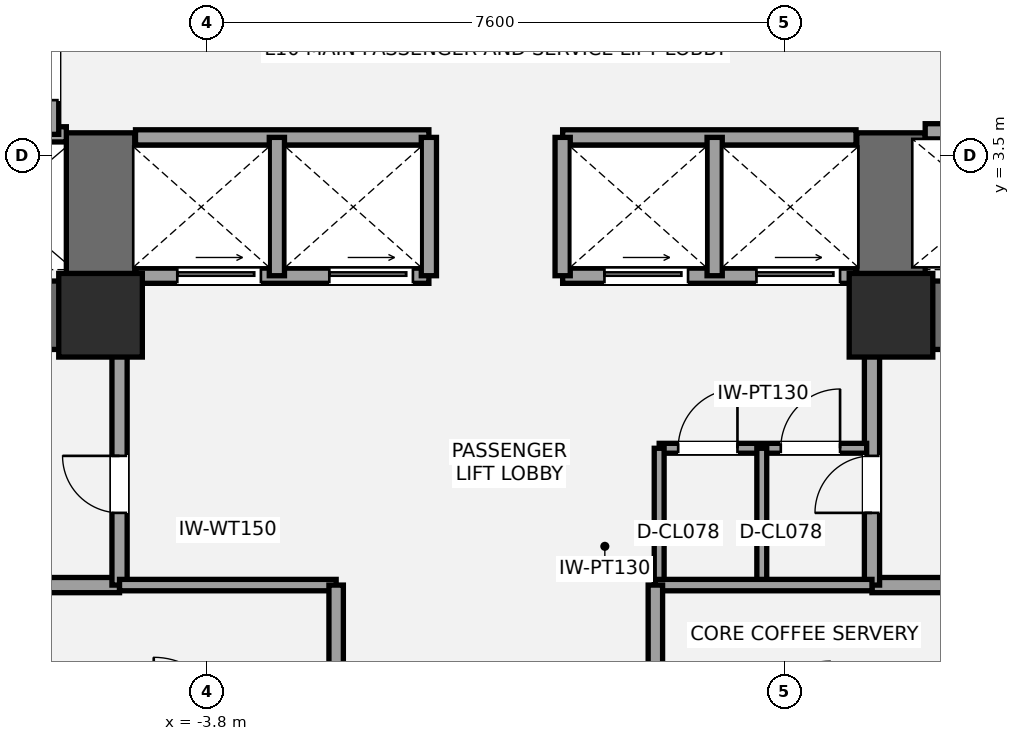
"""IFC4 building model, lengths in metres.
Left out: names, types, materials, properties, quantities, classifications, styles, units other than length and angle.
Written with IfcOpenShell. Run it as: python <this file> out.ifc"""

import sys

from ifc_helpers import new_model, si_unit, direction, frame, frame_2d, origin, origin_2d, place, context, subcontext, project, spatial, rectangle, extrude, element, fill, save


model = new_model("IFC4")
c1 = context("Model", 3, precision=1e-05, world=origin(), true_north=direction((0.0, 1.0)))
c2 = subcontext(c1, "Body", "Model", "MODEL_VIEW")
j1 = project(units=[si_unit("LENGTHUNIT", "METRE"), si_unit("PLANEANGLEUNIT", "RADIAN")], contexts=[c1])
p1 = place(None, origin())
s1 = spatial("IfcSite", under=j1, at=p1, CompositionType="ELEMENT")
p2 = place(p1, origin())
s2 = spatial("IfcBuilding", under=s1, at=p2, CompositionType="ELEMENT")
p3 = place(p2, frame((0.0, 0.0, 41.4)))
s3 = spatial("IfcBuildingStorey", under=s2, at=p3, CompositionType="ELEMENT", Elevation=41.4)
p4 = place(p3, frame((-4.75, 1.4, 0.0), z_axis=(0.0, 0.0, 1.0), x_axis=(-1.0, 0.0, 0.0)))
e1 = element("IfcWall", 1, at=p4, inside=s3, PredefinedType="SHEAR", context=c2, shape_type="SweptSolid", body=[
    extrude(rectangle(XDim=9.3, YDim=0.9, at=frame_2d((4.65, 0.0))), origin(), (0.0, 0.0, 1.0), 3.6),
])
p5 = place(p4, frame((5.55, 0.0, 0.0)))
e2 = element("IfcOpeningElement", 2, at=p5, cuts=e1, PredefinedType="OPENING", context=c2, shape_type="SweptSolid", body=[
    extrude(rectangle(XDim=1.05, YDim=2.15, at=frame_2d((0.525, 1.075))), frame((0.0, 0.46, 0.0), z_axis=(0.0, -1.0, 0.0), x_axis=(1.0, 0.0, 0.0)), (0.0, 0.0, 1.0), 0.92),
])
p6 = place(p4, frame((3.88, 0.0, 0.0)))
e3 = element("IfcOpeningElement", 3, at=p6, cuts=e1, PredefinedType="OPENING", context=c2, shape_type="SweptSolid", body=[
    extrude(rectangle(XDim=1.1, YDim=2.2, at=frame_2d((0.55, 1.1))), frame((0.0, 0.46, 0.0), z_axis=(0.0, -1.0, 0.0), x_axis=(1.0, 0.0, 0.0)), (0.0, 0.0, 1.0), 0.92),
])
p7 = place(p3, frame((-5.2, 0.95, 0.0), z_axis=(0.0, 0.0, 1.0), x_axis=(0.0, 1.0, 0.0)))
e4 = element("IfcWall", 4, at=p7, inside=s3, PredefinedType="SHEAR", context=c2, shape_type="SweptSolid", body=[
    extrude(rectangle(XDim=2.85, YDim=0.9, at=frame_2d((1.425, 0.0))), origin(), (0.0, 0.0, 1.0), 3.6),
])
p8 = place(p3, frame((14.05, 1.4, 0.0), z_axis=(0.0, 0.0, 1.0), x_axis=(-1.0, 0.0, 0.0)))
e5 = element("IfcWall", 5, at=p8, inside=s3, PredefinedType="SHEAR", context=c2, shape_type="SweptSolid", body=[
    extrude(rectangle(XDim=9.3, YDim=0.9, at=frame_2d((4.65, 0.0))), origin(), (0.0, 0.0, 1.0), 3.6),
])
p9 = place(p8, frame((2.7, 0.0, 0.0)))
e6 = element("IfcOpeningElement", 6, at=p9, cuts=e5, PredefinedType="OPENING", context=c2, shape_type="SweptSolid", body=[
    extrude(rectangle(XDim=1.05, YDim=2.15, at=frame_2d((0.525, 1.075))), frame((0.0, 0.46, 0.0), z_axis=(0.0, -1.0, 0.0), x_axis=(1.0, 0.0, 0.0)), (0.0, 0.0, 1.0), 0.92),
])
p10 = place(p8, frame((4.7, 0.0, 0.0)))
e7 = element("IfcOpeningElement", 7, at=p10, cuts=e5, PredefinedType="OPENING", context=c2, shape_type="SweptSolid", body=[
    extrude(rectangle(XDim=1.1, YDim=2.2, at=frame_2d((0.55, 1.1))), frame((0.0, 0.46, 0.0), z_axis=(0.0, -1.0, 0.0), x_axis=(1.0, 0.0, 0.0)), (0.0, 0.0, 1.0), 0.92),
])
p11 = place(p3, frame((5.2, 0.95, 0.0), z_axis=(0.0, 0.0, 1.0), x_axis=(0.0, 1.0, 0.0)))
e8 = element("IfcWall", 8, at=p11, inside=s3, PredefinedType="SHEAR", context=c2, shape_type="SweptSolid", body=[
    extrude(rectangle(XDim=2.85, YDim=0.9, at=frame_2d((1.425, 0.0))), origin(), (0.0, 0.0, 1.0), 3.6),
])
for number, where, z_axis, x_axis in (
    (9, (-5.2, 1.4, 0.0), (0.0, 0.0, 1.0), (1.0, 0.0, 0.0)),
    (10, (5.2, 1.4, 0.0), (0.0, 0.0, 1.0), (1.0, 0.0, 0.0)),
):
    element("IfcColumn", number, at=place(p3, frame(where, z_axis=z_axis, x_axis=x_axis)), inside=s3, PredefinedType="COLUMN", context=c2, shape_type="SweptSolid", body=[
        extrude(rectangle(XDim=1.1, YDim=1.1, at=origin_2d()), origin(), (0.0, 0.0, 1.0), 3.6),
    ])
p12 = place(p3, frame((-7.2, -2.15, 0.0), z_axis=(0.0, 0.0, 1.0), x_axis=(1.0, 0.0, 0.0)))
e11 = element("IfcWall", 11, at=p12, inside=s3, PredefinedType="SOLIDWALL", context=c2, shape_type="SweptSolid", body=[
    extrude(rectangle(XDim=2.25, YDim=0.2, at=frame_2d((1.125, 0.0))), origin(), (0.0, 0.0, 1.0), 3.4),
])
p13 = place(p3, frame((-4.95, -2.15, 0.0), z_axis=(0.0, 0.0, 1.0), x_axis=(0.0, 1.0, 0.0)))
e12 = element("IfcWall", 12, at=p13, inside=s3, PredefinedType="SOLIDWALL", context=c2, shape_type="SweptSolid", body=[
    extrude(rectangle(XDim=3.15, YDim=0.2, at=frame_2d((1.575, 0.0))), origin(), (0.0, 0.0, 1.0), 2.853),
])
p14 = place(p13, frame((0.95, 0.0, 0.0)))
e13 = element("IfcOpeningElement", 13, at=p14, cuts=e12, PredefinedType="OPENING", context=c2, shape_type="SweptSolid", body=[
    extrude(rectangle(XDim=0.75, YDim=2.1, at=frame_2d((0.375, 1.05))), frame((0.0, 0.11, 0.0), z_axis=(0.0, -1.0, 0.0), x_axis=(1.0, 0.0, 0.0)), (0.0, 0.0, 1.0), 0.22),
])
p15 = place(p3, frame((4.95, -2.15, 0.0), z_axis=(0.0, 0.0, 1.0), x_axis=(1.0, 0.0, 0.0)))
e14 = element("IfcWall", 14, at=p15, inside=s3, PredefinedType="SOLIDWALL", context=c2, shape_type="SweptSolid", body=[
    extrude(rectangle(XDim=2.25, YDim=0.2, at=frame_2d((1.125, 0.0))), origin(), (0.0, 0.0, 1.0), 3.4),
])
p16 = place(p3, frame((4.95, -2.15, 0.0), z_axis=(0.0, 0.0, 1.0), x_axis=(0.0, 1.0, 0.0)))
e15 = element("IfcWall", 15, at=p16, inside=s3, PredefinedType="SOLIDWALL", context=c2, shape_type="SweptSolid", body=[
    extrude(rectangle(XDim=3.15, YDim=0.2, at=frame_2d((1.575, 0.0))), origin(), (0.0, 0.0, 1.0), 3.4),
])
p17 = place(p16, frame((0.95, 0.0, 0.0)))
e16 = element("IfcOpeningElement", 16, at=p17, cuts=e15, PredefinedType="OPENING", context=c2, shape_type="SweptSolid", body=[
    extrude(rectangle(XDim=0.75, YDim=2.1, at=frame_2d((0.375, 1.05))), frame((0.0, 0.11, 0.0), z_axis=(0.0, -1.0, 0.0), x_axis=(1.0, 0.0, 0.0)), (0.0, 0.0, 1.0), 0.22),
])
p18 = place(p3, frame((2.15, -0.35, 0.0), z_axis=(0.0, 0.0, 1.0), x_axis=(1.0, 0.0, 0.0)))
e17 = element("IfcWall", 17, at=p18, inside=s3, PredefinedType="PARTITIONING", context=c2, shape_type="SweptSolid", body=[
    extrude(rectangle(XDim=2.73, YDim=0.13, at=frame_2d((1.365, 0.0))), origin(), (0.0, 0.0, 1.0), 3.4),
])
p19 = place(p18, frame((0.25, 0.0, 0.0)))
e18 = element("IfcOpeningElement", 18, at=p19, cuts=e17, PredefinedType="OPENING", context=c2, shape_type="SweptSolid", body=[
    extrude(rectangle(XDim=0.78, YDim=2.1, at=frame_2d((0.39, 1.05))), frame((0.0, 0.075, 0.0), z_axis=(0.0, -1.0, 0.0), x_axis=(1.0, 0.0, 0.0)), (0.0, 0.0, 1.0), 0.15),
])
p20 = place(p18, frame((1.6, 0.0, 0.0)))
e19 = element("IfcOpeningElement", 19, at=p20, cuts=e17, PredefinedType="OPENING", context=c2, shape_type="SweptSolid", body=[
    extrude(rectangle(XDim=0.78, YDim=2.1, at=frame_2d((0.39, 1.05))), frame((0.0, 0.075, 0.0), z_axis=(0.0, -1.0, 0.0), x_axis=(1.0, 0.0, 0.0)), (0.0, 0.0, 1.0), 0.15),
])
for number, where, z_axis, x_axis in (
    (20, (2.15, -2.15, 0.0), (0.0, 0.0, 1.0), (0.0, 1.0, 0.0)),
    (21, (3.5, -2.15, 0.0), (0.0, 0.0, 1.0), (0.0, 1.0, 0.0)),
):
    element("IfcWall", number, at=place(p3, frame(where, z_axis=z_axis, x_axis=x_axis)), inside=s3, PredefinedType="PARTITIONING", context=c2, shape_type="SweptSolid", body=[
        extrude(rectangle(XDim=1.8, YDim=0.13, at=frame_2d((0.9, 0.0))), origin(), (0.0, 0.0, 1.0), 3.4),
    ])
p21 = place(p3, frame((-9.78, 3.78, 0.0), z_axis=(0.0, 0.0, 1.0), x_axis=(1.0, 0.0, 0.0)))
e22 = element("IfcWall", 22, at=p21, inside=s3, PredefinedType="SOLIDWALL", context=c2, shape_type="SweptSolid", body=[
    extrude(rectangle(XDim=4.13, YDim=0.2, at=frame_2d((2.065, 0.0))), origin(), (0.0, 0.0, 1.0), 3.4),
])
p22 = place(p3, frame((-5.85, 3.78, 0.0), z_axis=(0.0, 0.0, 1.0), x_axis=(0.0, 1.0, 0.0)))
e23 = element("IfcWall", 23, at=p22, inside=s3, PredefinedType="SOLIDWALL", context=c2, shape_type="SweptSolid", body=[
    extrude(rectangle(XDim=1.69, YDim=0.2, at=frame_2d((0.845, 0.0))), origin(), (0.0, 0.0, 1.0), 3.4),
])
p23 = place(p22, frame((0.45, 0.0, 0.0)))
e24 = element("IfcOpeningElement", 24, at=p23, cuts=e23, PredefinedType="OPENING", context=c2, shape_type="SweptSolid", body=[
    extrude(rectangle(XDim=0.75, YDim=2.1, at=frame_2d((0.375, 1.05))), frame((0.0, 0.11, 0.0), z_axis=(0.0, -1.0, 0.0), x_axis=(1.0, 0.0, 0.0)), (0.0, 0.0, 1.0), 0.22),
])
p24 = place(p3, frame((5.65, 3.82, 0.0), z_axis=(0.0, 0.0, 1.0), x_axis=(1.0, 0.0, 0.0)))
e25 = element("IfcWall", 25, at=p24, inside=s3, PredefinedType="SOLIDWALL", context=c2, shape_type="SweptSolid", body=[
    extrude(rectangle(XDim=4.13, YDim=0.2, at=frame_2d((2.065, 0.0))), origin(), (0.0, 0.0, 1.0), 3.4),
])
p25 = place(p24, frame((0.65, 0.0, 0.0)))
e26 = element("IfcOpeningElement", 26, at=p25, cuts=e25, PredefinedType="OPENING", context=c2, shape_type="SweptSolid", body=[
    extrude(rectangle(XDim=1.2, YDim=2.2, at=frame_2d((0.6, 1.1))), frame((0.0, 0.11, 0.0), z_axis=(0.0, -1.0, 0.0), x_axis=(1.0, 0.0, 0.0)), (0.0, 0.0, 1.0), 0.22),
])
p26 = place(p3, frame((-4.74, 1.92, 0.0), z_axis=(0.0, 0.0, 1.0), x_axis=(1.0, 0.0, 0.0)))
e27 = element("IfcWall", 27, at=p26, inside=s3, PredefinedType="SOLIDWALL", context=c2, shape_type="SweptSolid", body=[
    extrude(rectangle(XDim=3.86, YDim=0.2, at=frame_2d((1.93, 0.0))), origin(), (0.0, 0.0, 1.0), 2.39),
])
p27 = place(p26, frame((0.55, 0.0, 0.0)))
e28 = element("IfcOpeningElement", 28, at=p27, cuts=e27, PredefinedType="OPENING", context=c2, shape_type="SweptSolid", body=[
    extrude(rectangle(XDim=1.1, YDim=2.2, at=frame_2d((0.55, 1.1))), frame((0.0, 0.11, 0.0), z_axis=(0.0, -1.0, 0.0), x_axis=(1.0, 0.0, 0.0)), (0.0, 0.0, 1.0), 0.22),
])
p28 = place(p26, frame((2.55, 0.0, 0.0)))
e29 = element("IfcOpeningElement", 29, at=p28, cuts=e27, PredefinedType="OPENING", context=c2, shape_type="SweptSolid", body=[
    extrude(rectangle(XDim=1.1, YDim=2.2, at=frame_2d((0.55, 1.1))), frame((0.0, 0.11, 0.0), z_axis=(0.0, -1.0, 0.0), x_axis=(1.0, 0.0, 0.0)), (0.0, 0.0, 1.0), 0.22),
])
p29 = place(p3, frame((0.88, 1.92, 0.0), z_axis=(0.0, 0.0, 1.0), x_axis=(1.0, 0.0, 0.0)))
e30 = element("IfcWall", 30, at=p29, inside=s3, PredefinedType="SOLIDWALL", context=c2, shape_type="SweptSolid", body=[
    extrude(rectangle(XDim=3.86, YDim=0.2, at=frame_2d((1.93, 0.0))), origin(), (0.0, 0.0, 1.0), 2.39),
])
p30 = place(p29, frame((0.55, 0.0, 0.0)))
e31 = element("IfcOpeningElement", 31, at=p30, cuts=e30, PredefinedType="OPENING", context=c2, shape_type="SweptSolid", body=[
    extrude(rectangle(XDim=1.1, YDim=2.2, at=frame_2d((0.55, 1.1))), frame((0.0, 0.11, 0.0), z_axis=(0.0, -1.0, 0.0), x_axis=(1.0, 0.0, 0.0)), (0.0, 0.0, 1.0), 0.22),
])
p31 = place(p29, frame((2.55, 0.0, 0.0)))
e32 = element("IfcOpeningElement", 32, at=p31, cuts=e30, PredefinedType="OPENING", context=c2, shape_type="SweptSolid", body=[
    extrude(rectangle(XDim=1.1, YDim=2.2, at=frame_2d((0.55, 1.1))), frame((0.0, 0.11, 0.0), z_axis=(0.0, -1.0, 0.0), x_axis=(1.0, 0.0, 0.0)), (0.0, 0.0, 1.0), 0.22),
])
for number, where, z_axis, x_axis in (
    (33, (-4.74, 3.74, 0.0), (0.0, 0.0, 1.0), (1.0, 0.0, 0.0)),
    (34, (0.88, 3.74, 0.0), (0.0, 0.0, 1.0), (1.0, 0.0, 0.0)),
):
    element("IfcWall", number, at=place(p3, frame(where, z_axis=z_axis, x_axis=x_axis)), inside=s3, PredefinedType="SOLIDWALL", context=c2, shape_type="SweptSolid", body=[
        extrude(rectangle(XDim=3.86, YDim=0.2, at=frame_2d((1.93, 0.0))), origin(), (0.0, 0.0, 1.0), 3.4),
    ])
for number, where, z_axis, x_axis in (
    (35, (-2.88, 1.92, 0.0), (0.0, 0.0, 1.0), (0.0, 1.0, 0.0)),
    (36, (2.88, 1.92, 0.0), (0.0, 0.0, 1.0), (0.0, 1.0, 0.0)),
    (37, (-0.88, 1.92, 0.0), (0.0, 0.0, 1.0), (0.0, 1.0, 0.0)),
    (38, (0.88, 1.92, 0.0), (0.0, 0.0, 1.0), (0.0, 1.0, 0.0)),
):
    element("IfcWall", number, at=place(p3, frame(where, z_axis=z_axis, x_axis=x_axis)), inside=s3, PredefinedType="SOLIDWALL", context=c2, shape_type="SweptSolid", body=[
        extrude(rectangle(XDim=1.82, YDim=0.2, at=frame_2d((0.91, 0.0))), origin(), (0.0, 0.0, 1.0), 3.4),
    ])
p32 = place(p3, frame((-4.95, -2.15, 0.0), z_axis=(0.0, 0.0, 1.0), x_axis=(1.0, 0.0, 0.0)))
e39 = element("IfcWall", 39, at=p32, inside=s3, PredefinedType="PLUMBINGWALL", context=c2, shape_type="SweptSolid", body=[
    extrude(rectangle(XDim=2.85, YDim=0.15, at=frame_2d((1.425, 0.0))), origin(), (0.0, 0.0, 1.0), 2.853),
])
p33 = place(p3, frame((-2.1, -4.05, 0.0), z_axis=(0.0, 0.0, 1.0), x_axis=(0.0, 1.0, 0.0)))
e40 = element("IfcWall", 40, at=p33, inside=s3, PredefinedType="PLUMBINGWALL", context=c2, shape_type="SweptSolid", body=[
    extrude(rectangle(XDim=1.9, YDim=0.19, at=frame_2d((0.95, 0.0))), origin(), (0.0, 0.0, 1.0), 3.4),
])
p34 = place(p3, frame((2.1, -2.15, 0.0), z_axis=(0.0, 0.0, 1.0), x_axis=(1.0, 0.0, 0.0)))
e41 = element("IfcWall", 41, at=p34, inside=s3, PredefinedType="PLUMBINGWALL", context=c2, shape_type="SweptSolid", body=[
    extrude(rectangle(XDim=2.85, YDim=0.15, at=frame_2d((1.425, 0.0))), origin(), (0.0, 0.0, 1.0), 3.4),
])
p35 = place(p3, frame((2.1, -4.05, 0.0), z_axis=(0.0, 0.0, 1.0), x_axis=(0.0, 1.0, 0.0)))
e42 = element("IfcWall", 42, at=p35, inside=s3, PredefinedType="PLUMBINGWALL", context=c2, shape_type="SweptSolid", body=[
    extrude(rectangle(XDim=1.9, YDim=0.19, at=frame_2d((0.95, 0.0))), origin(), (0.0, 0.0, 1.0), 3.4),
])
p36 = place(p14, origin())
e43 = element("IfcDoor", 43, at=p36, inside=s3, OperationType="SINGLE_SWING_RIGHT", PredefinedType="DOOR", context=c2, shape_type="SweptSolid", body=[
    extrude(rectangle(XDim=0.75, YDim=2.1, at=frame_2d((0.375, 1.05))), frame((0.0, 0.025, 0.0), z_axis=(0.0, -1.0, 0.0), x_axis=(1.0, 0.0, 0.0)), (0.0, 0.0, 1.0), 0.05),
])
fill(e13, e43)
p37 = place(p17, origin())
e44 = element("IfcDoor", 44, at=p37, inside=s3, OperationType="SINGLE_SWING_LEFT", PredefinedType="DOOR", context=c2, shape_type="SweptSolid", body=[
    extrude(rectangle(XDim=0.75, YDim=2.1, at=frame_2d((0.375, 1.05))), frame((0.0, 0.025, 0.0), z_axis=(0.0, -1.0, 0.0), x_axis=(1.0, 0.0, 0.0)), (0.0, 0.0, 1.0), 0.05),
])
fill(e16, e44)
p38 = place(p19, origin())
e45 = element("IfcDoor", 45, at=p38, inside=s3, OperationType="SINGLE_SWING_RIGHT", PredefinedType="DOOR", context=c2, shape_type="SweptSolid", body=[
    extrude(rectangle(XDim=0.78, YDim=2.1, at=frame_2d((0.39, 1.05))), frame((0.0, 0.025, 0.0), z_axis=(0.0, -1.0, 0.0), x_axis=(1.0, 0.0, 0.0)), (0.0, 0.0, 1.0), 0.05),
])
fill(e18, e45)
p39 = place(p20, origin())
e46 = element("IfcDoor", 46, at=p39, inside=s3, OperationType="SINGLE_SWING_RIGHT", PredefinedType="DOOR", context=c2, shape_type="SweptSolid", body=[
    extrude(rectangle(XDim=0.78, YDim=2.1, at=frame_2d((0.39, 1.05))), frame((0.0, 0.025, 0.0), z_axis=(0.0, -1.0, 0.0), x_axis=(1.0, 0.0, 0.0)), (0.0, 0.0, 1.0), 0.05),
])
fill(e19, e46)
p40 = place(p23, origin())
e47 = element("IfcDoor", 47, at=p40, inside=s3, OperationType="SINGLE_SWING_RIGHT", PredefinedType="DOOR", context=c2, shape_type="SweptSolid", body=[
    extrude(rectangle(XDim=0.75, YDim=2.1, at=frame_2d((0.375, 1.05))), frame((0.0, 0.025, 0.0), z_axis=(0.0, -1.0, 0.0), x_axis=(1.0, 0.0, 0.0)), (0.0, 0.0, 1.0), 0.05),
])
fill(e24, e47)
p41 = place(p27, origin())
e48 = element("IfcDoor", 48, at=p41, inside=s3, OperationType="SLIDING_TO_LEFT", PredefinedType="DOOR", context=c2, shape_type="SweptSolid", body=[
    extrude(rectangle(XDim=1.1, YDim=2.2, at=frame_2d((0.55, 1.1))), frame((0.0, 0.025, 0.0), z_axis=(0.0, -1.0, 0.0), x_axis=(1.0, 0.0, 0.0)), (0.0, 0.0, 1.0), 0.05),
])
fill(e28, e48)
p42 = place(p28, origin())
e49 = element("IfcDoor", 49, at=p42, inside=s3, OperationType="SLIDING_TO_LEFT", PredefinedType="DOOR", context=c2, shape_type="SweptSolid", body=[
    extrude(rectangle(XDim=1.1, YDim=2.2, at=frame_2d((0.55, 1.1))), frame((0.0, 0.025, 0.0), z_axis=(0.0, -1.0, 0.0), x_axis=(1.0, 0.0, 0.0)), (0.0, 0.0, 1.0), 0.05),
])
fill(e29, e49)
p43 = place(p30, origin())
e50 = element("IfcDoor", 50, at=p43, inside=s3, OperationType="SLIDING_TO_LEFT", PredefinedType="DOOR", context=c2, shape_type="SweptSolid", body=[
    extrude(rectangle(XDim=1.1, YDim=2.2, at=frame_2d((0.55, 1.1))), frame((0.0, 0.025, 0.0), z_axis=(0.0, -1.0, 0.0), x_axis=(1.0, 0.0, 0.0)), (0.0, 0.0, 1.0), 0.05),
])
fill(e31, e50)
p44 = place(p31, origin())
e51 = element("IfcDoor", 51, at=p44, inside=s3, OperationType="SLIDING_TO_LEFT", PredefinedType="DOOR", context=c2, shape_type="SweptSolid", body=[
    extrude(rectangle(XDim=1.1, YDim=2.2, at=frame_2d((0.55, 1.1))), frame((0.0, 0.025, 0.0), z_axis=(0.0, -1.0, 0.0), x_axis=(1.0, 0.0, 0.0)), (0.0, 0.0, 1.0), 0.05),
])
fill(e32, e51)
save(model, sys.argv[1])
